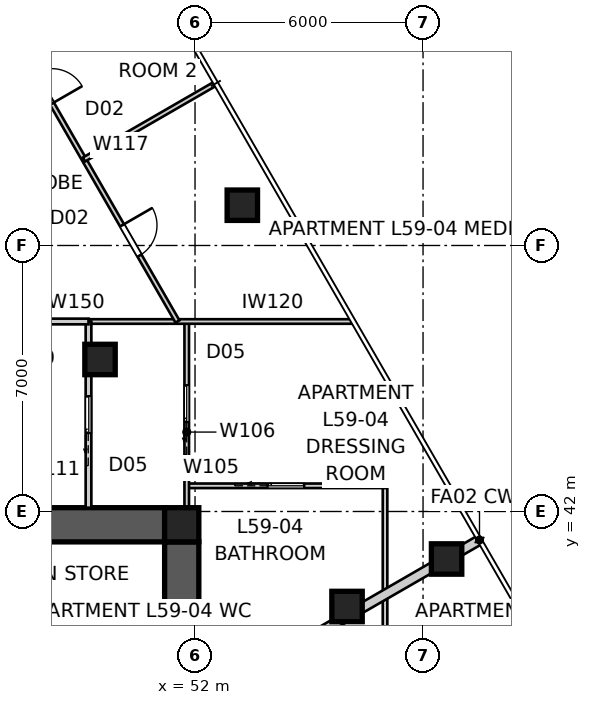
"""IFC4 building model, lengths in metres.
Left out: names, types, materials, properties, quantities, classifications, styles, units other than length and angle.
Written with IfcOpenShell. Run it as: python <this file> out.ifc"""

import sys

from ifc_helpers import new_model, si_unit, direction, frame, frame_2d, origin, origin_2d, place, context, subcontext, project, spatial, polyline, rectangle, outline, extrude, element, fill, save


model = new_model("IFC4")
c1 = context("Model", 3, precision=1e-05, world=origin(), true_north=direction((0.0, 1.0)))
c2 = subcontext(c1, "Body", "Model", "MODEL_VIEW")
j1 = project(units=[si_unit("LENGTHUNIT", "METRE"), si_unit("PLANEANGLEUNIT", "RADIAN")], contexts=[c1])
p1 = place(None, origin())
s1 = spatial("IfcSite", under=j1, at=p1, CompositionType="ELEMENT")
p2 = place(p1, origin())
s2 = spatial("IfcBuilding", under=s1, at=p2, CompositionType="ELEMENT")
p3 = place(p2, frame((0.0, 0.0, 215.0)))
s3 = spatial("IfcBuildingStorey", under=s2, at=p3, CompositionType="ELEMENT", Elevation=215.0)
p4 = place(p3, frame((28.8, 41.65, 0.0), z_axis=(0.0, 0.0, 1.0), x_axis=(1.0, 0.0, 0.0)))
e1 = element("IfcWall", 1, at=p4, inside=s3, PredefinedType="SHEAR", context=c2, shape_type="SweptSolid", body=[
    extrude(outline(polyline([(0.0, -0.45), (22.4, -0.45), (22.4, -0.025), (22.85, -0.025), (22.85, 0.025), (22.4, 0.025), (22.4, 0.45), (0.0, 0.45), (0.0, 0.025), (-0.45, 0.025), (-0.45, -0.025), (0.0, -0.025), (0.0, -0.45)])), origin(), (0.0, 0.0, 1.0), 3.4),
])
p5 = place(p3, frame((51.65, 18.8, 0.0), z_axis=(0.0, 0.0, 1.0), x_axis=(0.0, 1.0, 0.0)))
e2 = element("IfcWall", 2, at=p5, inside=s3, PredefinedType="SHEAR", context=c2, shape_type="SweptSolid", body=[
    extrude(outline(polyline([(0.0, -0.45), (22.4, -0.45), (22.4, -0.025), (22.85, -0.025), (22.85, 0.025), (22.4, 0.025), (22.4, 0.45), (0.0, 0.45), (0.0, 0.025), (-0.45, 0.025), (-0.45, -0.025), (0.0, -0.025), (0.0, -0.45)])), origin(), (0.0, 0.0, 1.0), 3.4),
])
p6 = place(p5, frame((11.14, 0.0, 0.0)))
e3 = element("IfcOpeningElement", 3, at=p6, cuts=e2, PredefinedType="OPENING", context=c2, shape_type="SweptSolid", body=[
    extrude(rectangle(XDim=1.02, YDim=2.4, at=frame_2d((0.51, 1.2))), frame((0.0, 0.46, 0.0), z_axis=(0.0, -1.0, 0.0), x_axis=(1.0, 0.0, 0.0)), (0.0, 0.0, 1.0), 0.92),
])
p7 = place(p3, frame((51.65, 41.65, 0.0), z_axis=(0.0, 0.0, 1.0), x_axis=(1.0, 0.0, 0.0)))
e4 = element("IfcColumn", 4, at=p7, inside=s3, PredefinedType="COLUMN", context=c2, shape_type="SweptSolid", body=[
    extrude(rectangle(XDim=0.9, YDim=0.9, at=origin_2d()), origin(), (0.0, 0.0, 1.0), 3.4),
])
for number, where, z_axis, x_axis in (
    (5, (58.62, 40.75, 0.0), (0.0, 0.0, 1.0), (1.0, 0.0, 0.0)),
    (6, (53.245, 50.06, 0.0), (0.0, 0.0, 1.0), (1.0, 0.0, 0.0)),
    (7, (56.0, 39.5, 0.0), (0.0, 0.0, 1.0), (1.0, 0.0, 0.0)),
    (8, (49.5, 46.0, 0.0), (0.0, 0.0, 1.0), (1.0, 0.0, 0.0)),
):
    element("IfcColumn", number, at=place(p3, frame(where, z_axis=z_axis, x_axis=x_axis)), inside=s3, PredefinedType="COLUMN", context=c2, shape_type="SweptSolid", body=[
        extrude(rectangle(XDim=0.8, YDim=0.8, at=origin_2d()), origin(), (0.0, 0.0, 1.0), 3.4),
    ])
p8 = place(p3, frame((59.486, 41.25, 0.0), z_axis=(0.0, 0.0, 1.0), x_axis=(-0.866020489494, -0.500008511703, 0.0)))
e9 = element("IfcWall", 9, at=p8, inside=s3, PredefinedType="PARTITIONING", context=c2, shape_type="SweptSolid", body=[
    extrude(rectangle(XDim=8.496, YDim=0.25, at=frame_2d((4.248, 0.0))), origin(), (0.0, 0.0, 1.0), 3.25),
])
p9 = place(p3, frame((57.0, 42.676, 0.0), z_axis=(0.0, 0.0, 1.0), x_axis=(0.0, -1.0, 0.0)))
e10 = element("IfcWall", 10, at=p9, inside=s3, PredefinedType="PARTITIONING", context=c2, shape_type="SweptSolid", body=[
    extrude(rectangle(XDim=23.19, YDim=0.12, at=frame_2d((11.595, 0.0))), origin(), (0.0, 0.0, 1.0), 2.55),
])
p10 = place(p9, frame((11.03, 0.0, 0.0)))
e11 = element("IfcOpeningElement", 11, at=p10, cuts=e10, PredefinedType="OPENING", context=c2, shape_type="SweptSolid", body=[
    extrude(rectangle(XDim=0.92, YDim=2.34, at=frame_2d((0.46, 1.17))), frame((0.0, 0.07, 0.0), z_axis=(0.0, -1.0, 0.0), x_axis=(1.0, 0.0, 0.0)), (0.0, 0.0, 1.0), 0.14),
])
p11 = place(p9, frame((15.181, 0.0, 0.0)))
e12 = element("IfcOpeningElement", 12, at=p11, cuts=e10, PredefinedType="OPENING", context=c2, shape_type="SweptSolid", body=[
    extrude(rectangle(XDim=0.92, YDim=2.34, at=frame_2d((0.46, 1.17))), frame((0.0, 0.07, 0.0), z_axis=(0.0, -1.0, 0.0), x_axis=(1.0, 0.0, 0.0)), (0.0, 0.0, 1.0), 0.14),
])
p12 = place(p3, frame((51.782, 42.676, 0.0), z_axis=(0.0, 0.0, 1.0), x_axis=(1.0, 0.0, 0.0)))
e13 = element("IfcWall", 13, at=p12, inside=s3, PredefinedType="PARTITIONING", context=c2, shape_type="SweptSolid", body=[
    extrude(rectangle(XDim=5.218, YDim=0.12, at=frame_2d((2.609, 0.0))), origin(), (0.0, 0.0, 1.0), 3.25),
])
p13 = place(p12, frame((2.129, 0.0, 0.0)))
e14 = element("IfcOpeningElement", 14, at=p13, cuts=e13, PredefinedType="OPENING", context=c2, shape_type="SweptSolid", body=[
    extrude(rectangle(XDim=0.96, YDim=2.1, at=frame_2d((0.48, 1.05))), frame((0.0, 0.07, 0.0), z_axis=(0.0, -1.0, 0.0), x_axis=(1.0, 0.0, 0.0)), (0.0, 0.0, 1.0), 0.14),
])
p14 = place(p3, frame((51.782, 41.18, 0.0), z_axis=(0.0, 0.0, 1.0), x_axis=(0.0, 1.0, 0.0)))
e15 = element("IfcWall", 15, at=p14, inside=s3, PredefinedType="PARTITIONING", context=c2, shape_type="SweptSolid", body=[
    extrude(rectangle(XDim=5.82, YDim=0.12, at=frame_2d((2.91, 0.0))), origin(), (0.0, 0.0, 1.0), 3.25),
])
p15 = place(p14, frame((3.178, 0.0, 0.0)))
e16 = element("IfcOpeningElement", 16, at=p15, cuts=e15, PredefinedType="OPENING", context=c2, shape_type="SweptSolid", body=[
    extrude(rectangle(XDim=0.96, YDim=2.1, at=frame_2d((0.48, 1.05))), frame((0.0, 0.07, 0.0), z_axis=(0.0, -1.0, 0.0), x_axis=(1.0, 0.0, 0.0)), (0.0, 0.0, 1.0), 0.14),
])
p16 = place(p3, frame((49.197, 47.0, 0.0), z_axis=(0.0, 0.0, 1.0), x_axis=(1.0, 0.0, 0.0)))
e17 = element("IfcWall", 17, at=p16, inside=s3, PredefinedType="PARTITIONING", context=c2, shape_type="SweptSolid", body=[
    extrude(rectangle(XDim=6.923, YDim=0.12, at=frame_2d((3.461, 0.0))), origin(), (0.0, 0.0, 1.0), 3.25),
])
p17 = place(p3, frame((49.197, 42.1, 0.0), z_axis=(0.0, 0.0, 1.0), x_axis=(0.0, 1.0, 0.0)))
e18 = element("IfcWall", 18, at=p17, inside=s3, PredefinedType="SOLIDWALL", context=c2, shape_type="SweptSolid", body=[
    extrude(rectangle(XDim=4.9, YDim=0.15, at=frame_2d((2.45, 0.0))), origin(), (0.0, 0.0, 1.0), 3.25),
])
p18 = place(p17, frame((1.97, 0.0, 0.0)))
e19 = element("IfcOpeningElement", 19, at=p18, cuts=e18, PredefinedType="OPENING", context=c2, shape_type="SweptSolid", body=[
    extrude(rectangle(XDim=0.96, YDim=2.1, at=frame_2d((0.48, 1.05))), frame((0.0, 0.085, 0.0), z_axis=(0.0, -1.0, 0.0), x_axis=(1.0, 0.0, 0.0)), (0.0, 0.0, 1.0), 0.17),
])
p19 = place(p3, frame((46.612, 47.0, 0.0), z_axis=(0.0, 0.0, 1.0), x_axis=(1.0, 0.0, 0.0)))
e20 = element("IfcWall", 20, at=p19, inside=s3, PredefinedType="SOLIDWALL", context=c2, shape_type="SweptSolid", body=[
    extrude(rectangle(XDim=2.585, YDim=0.15, at=frame_2d((1.292, 0.0))), origin(), (0.0, 0.0, 1.0), 3.25),
])
p20 = place(p3, frame((46.792, 55.237, 0.0), z_axis=(0.0, 0.0, 1.0), x_axis=(0.49923620881, -0.866465929978, 0.0)))
e21 = element("IfcWall", 21, at=p20, inside=s3, PredefinedType="PARTITIONING", context=c2, shape_type="SweptSolid", body=[
    extrude(rectangle(XDim=9.506, YDim=0.12, at=frame_2d((4.753, 0.0))), origin(), (0.0, 0.0, 1.0), 3.25),
])
p21 = place(p20, frame((6.586, 0.0, 0.0)))
e22 = element("IfcOpeningElement", 22, at=p21, cuts=e21, PredefinedType="OPENING", context=c2, shape_type="SweptSolid", body=[
    extrude(rectangle(XDim=0.92, YDim=2.34, at=frame_2d((0.46, 1.17))), frame((0.0, 0.07, 0.0), z_axis=(0.0, -1.0, 0.0), x_axis=(1.0, 0.0, 0.0)), (0.0, 0.0, 1.0), 0.14),
])
p22 = place(p20, frame((1.969, 0.0, 0.0)))
e23 = element("IfcOpeningElement", 23, at=p22, cuts=e21, PredefinedType="OPENING", context=c2, shape_type="SweptSolid", body=[
    extrude(rectangle(XDim=0.92, YDim=2.34, at=frame_2d((0.46, 1.17))), frame((0.0, 0.07, 0.0), z_axis=(0.0, -1.0, 0.0), x_axis=(1.0, 0.0, 0.0)), (0.0, 0.0, 1.0), 0.14),
])
p23 = place(p3, frame((49.077, 51.262, 0.0), z_axis=(0.0, 0.0, 1.0), x_axis=(0.865992964694, 0.500056181943, 0.0)))
e24 = element("IfcWall", 24, at=p23, inside=s3, PredefinedType="PARTITIONING", context=c2, shape_type="SweptSolid", body=[
    extrude(rectangle(XDim=3.968, YDim=0.12, at=frame_2d((1.984, 0.0))), origin(), (0.0, 0.0, 1.0), 3.25),
])
p24 = place(p18, origin())
e25 = element("IfcDoor", 25, at=p24, inside=s3, OperationType="SLIDING_TO_LEFT", PredefinedType="DOOR", context=c2, shape_type="SweptSolid", body=[
    extrude(rectangle(XDim=0.96, YDim=2.1, at=frame_2d((0.48, 1.05))), frame((0.0, 0.025, 0.0), z_axis=(0.0, -1.0, 0.0), x_axis=(1.0, 0.0, 0.0)), (0.0, 0.0, 1.0), 0.05),
])
fill(e19, e25)
p25 = place(p21, origin())
e26 = element("IfcDoor", 26, at=p25, inside=s3, OperationType="SINGLE_SWING_LEFT", PredefinedType="DOOR", context=c2, shape_type="SweptSolid", body=[
    extrude(rectangle(XDim=0.92, YDim=2.34, at=frame_2d((0.46, 1.17))), frame((0.0, 0.025, 0.0), z_axis=(0.0, -1.0, 0.0), x_axis=(1.0, 0.0, 0.0)), (0.0, 0.0, 1.0), 0.05),
])
fill(e22, e26)
p26 = place(p22, origin())
e27 = element("IfcDoor", 27, at=p26, inside=s3, OperationType="SINGLE_SWING_RIGHT", PredefinedType="DOOR", context=c2, shape_type="SweptSolid", body=[
    extrude(rectangle(XDim=0.92, YDim=2.34, at=frame_2d((0.46, 1.17))), frame((0.0, 0.025, 0.0), z_axis=(0.0, -1.0, 0.0), x_axis=(1.0, 0.0, 0.0)), (0.0, 0.0, 1.0), 0.05),
])
fill(e23, e27)
p27 = place(p15, origin())
e28 = element("IfcDoor", 28, at=p27, inside=s3, OperationType="SLIDING_TO_LEFT", PredefinedType="DOOR", context=c2, shape_type="SweptSolid", body=[
    extrude(rectangle(XDim=0.96, YDim=2.1, at=frame_2d((0.48, 1.05))), frame((0.0, 0.025, 0.0), z_axis=(0.0, -1.0, 0.0), x_axis=(1.0, 0.0, 0.0)), (0.0, 0.0, 1.0), 0.05),
])
fill(e16, e28)
p28 = place(p13, origin())
e29 = element("IfcDoor", 29, at=p28, inside=s3, OperationType="SLIDING_TO_LEFT", PredefinedType="DOOR", context=c2, shape_type="SweptSolid", body=[
    extrude(rectangle(XDim=0.96, YDim=2.1, at=frame_2d((0.48, 1.05))), frame((0.0, 0.025, 0.0), z_axis=(0.0, -1.0, 0.0), x_axis=(1.0, 0.0, 0.0)), (0.0, 0.0, 1.0), 0.05),
])
fill(e14, e29)
save(model, sys.argv[1])
